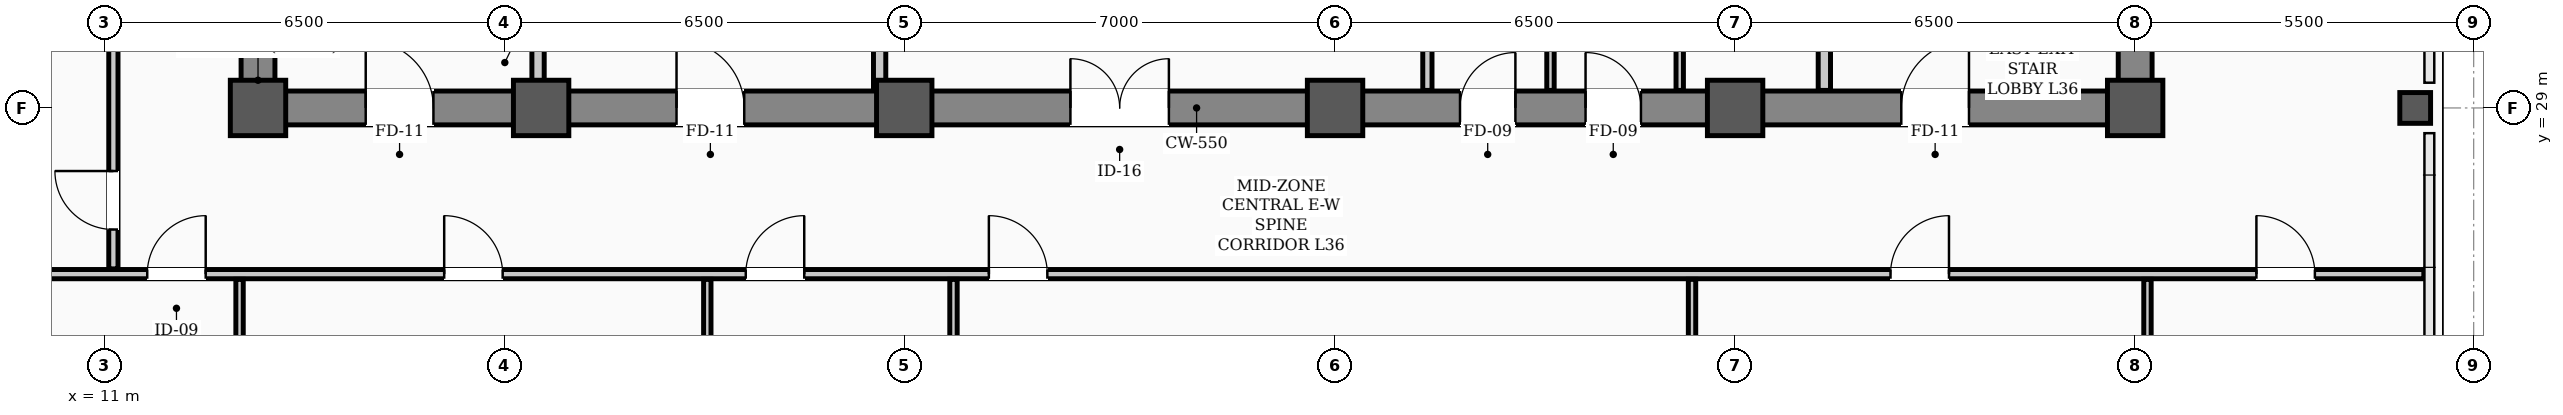
"""IFC4 building model, lengths in metres.
Left out: names, types, materials, properties, quantities, classifications, styles, units other than length and angle.
Written with IfcOpenShell. Run it as: python <this file> out.ifc"""

import sys

from ifc_helpers import new_model, si_unit, direction, frame, frame_2d, origin, origin_2d, place, context, subcontext, project, spatial, rectangle, hollow_rectangle, extrude, element, fill, save


model = new_model("IFC4")
c1 = context("Model", 3, precision=1e-05, world=origin(), true_north=direction((0.0, 1.0)))
c2 = subcontext(c1, "Body", "Model", "MODEL_VIEW")
j1 = project(units=[si_unit("LENGTHUNIT", "METRE"), si_unit("PLANEANGLEUNIT", "RADIAN")], contexts=[c1])
p1 = place(None, origin())
s1 = spatial("IfcSite", under=j1, at=p1, CompositionType="ELEMENT")
p2 = place(p1, origin())
s2 = spatial("IfcBuilding", under=s1, at=p2, CompositionType="ELEMENT")
p3 = place(p2, frame((0.0, 0.0, 146.1)))
s3 = spatial("IfcBuildingStorey", under=s2, at=p3, CompositionType="ELEMENT", Elevation=146.1)
for number, where, z_axis, x_axis in (
    (1, (13.5, 29.0, 0.0), (0.0, 0.0, 1.0), (1.0, 0.0, 0.0)),
    (2, (18.1, 29.0, 0.0), (0.0, 0.0, 1.0), (1.0, 0.0, 0.0)),
    (3, (24.0, 29.0, 0.0), (0.0, 0.0, 1.0), (1.0, 0.0, 0.0)),
    (4, (31.0, 29.0, 0.0), (0.0, 0.0, 1.0), (1.0, 0.0, 0.0)),
    (5, (37.5, 29.0, 0.0), (0.0, 0.0, 1.0), (1.0, 0.0, 0.0)),
    (6, (44.0, 29.0, 0.0), (0.0, 0.0, 1.0), (1.0, 0.0, 0.0)),
):
    element("IfcColumn", number, at=place(p3, frame(where, z_axis=z_axis, x_axis=x_axis)), inside=s3, PredefinedType="COLUMN", context=c2, shape_type="SweptSolid", body=[
        extrude(hollow_rectangle(XDim=0.9, YDim=0.9, WallThickness=0.035, InnerFilletRadius=0.017, OuterFilletRadius=0.052, at=origin_2d()), origin(), (0.0, 0.0, 1.0), 3.9),
    ])
p4 = place(p3, frame((48.55, 29.0, 0.0), z_axis=(0.0, 0.0, 1.0), x_axis=(1.0, 0.0, 0.0)))
e7 = element("IfcColumn", 7, at=p4, inside=s3, PredefinedType="COLUMN", context=c2, shape_type="SweptSolid", body=[
    extrude(hollow_rectangle(XDim=0.5, YDim=0.5, WallThickness=0.024, InnerFilletRadius=0.012, OuterFilletRadius=0.036, at=origin_2d()), origin(), (0.0, 0.0, 1.0), 3.9),
])
p5 = place(p3, frame((13.5, 29.0, 0.0), z_axis=(0.0, 0.0, 1.0), x_axis=(1.0, 0.0, 0.0)))
e8 = element("IfcWall", 8, at=p5, inside=s3, PredefinedType="SHEAR", context=c2, shape_type="SweptSolid", body=[
    extrude(rectangle(XDim=30.5, YDim=0.55, at=frame_2d((15.25, 0.0))), origin(), (0.0, 0.0, 1.0), 3.72),
])
p6 = place(p5, frame((1.75, 0.0, 0.0)))
e9 = element("IfcOpeningElement", 9, at=p6, cuts=e8, PredefinedType="OPENING", context=c2, shape_type="SweptSolid", body=[
    extrude(rectangle(XDim=1.1, YDim=2.08, at=frame_2d((0.55, 1.04))), frame((0.0, 0.285, 0.0), z_axis=(0.0, -1.0, 0.0), x_axis=(1.0, 0.0, 0.0)), (0.0, 0.0, 1.0), 0.57),
])
p7 = place(p5, frame((26.7, 0.0, 0.0)))
e10 = element("IfcOpeningElement", 10, at=p7, cuts=e8, PredefinedType="OPENING", context=c2, shape_type="SweptSolid", body=[
    extrude(rectangle(XDim=1.1, YDim=2.08, at=frame_2d((0.55, 1.04))), frame((0.0, 0.285, 0.0), z_axis=(0.0, -1.0, 0.0), x_axis=(1.0, 0.0, 0.0)), (0.0, 0.0, 1.0), 0.57),
])
p8 = place(p5, frame((6.8, 0.0, 0.0)))
e11 = element("IfcOpeningElement", 11, at=p8, cuts=e8, PredefinedType="OPENING", context=c2, shape_type="SweptSolid", body=[
    extrude(rectangle(XDim=1.1, YDim=2.08, at=frame_2d((0.55, 1.04))), frame((0.0, 0.285, 0.0), z_axis=(0.0, -1.0, 0.0), x_axis=(1.0, 0.0, 0.0)), (0.0, 0.0, 1.0), 0.57),
])
p9 = place(p5, frame((13.2, 0.0, 0.0)))
e12 = element("IfcOpeningElement", 12, at=p9, cuts=e8, PredefinedType="OPENING", context=c2, shape_type="SweptSolid", body=[
    extrude(rectangle(XDim=1.6, YDim=2.08, at=frame_2d((0.8, 1.04))), frame((0.0, 0.285, 0.0), z_axis=(0.0, -1.0, 0.0), x_axis=(1.0, 0.0, 0.0)), (0.0, 0.0, 1.0), 0.57),
])
p10 = place(p5, frame((19.53, 0.0, 0.0)))
e13 = element("IfcOpeningElement", 13, at=p10, cuts=e8, PredefinedType="OPENING", context=c2, shape_type="SweptSolid", body=[
    extrude(rectangle(XDim=0.9, YDim=2.08, at=frame_2d((0.45, 1.04))), frame((0.0, 0.285, 0.0), z_axis=(0.0, -1.0, 0.0), x_axis=(1.0, 0.0, 0.0)), (0.0, 0.0, 1.0), 0.57),
])
p11 = place(p5, frame((21.57, 0.0, 0.0)))
e14 = element("IfcOpeningElement", 14, at=p11, cuts=e8, PredefinedType="OPENING", context=c2, shape_type="SweptSolid", body=[
    extrude(rectangle(XDim=0.9, YDim=2.08, at=frame_2d((0.45, 1.04))), frame((0.0, 0.285, 0.0), z_axis=(0.0, -1.0, 0.0), x_axis=(1.0, 0.0, 0.0)), (0.0, 0.0, 1.0), 0.57),
])
for number, where, z_axis, x_axis in (
    (15, (13.5, 29.35, 0.0), (0.0, 0.0, 1.0), (0.0, 1.0, 0.0)),
    (16, (44.0, 29.35, 0.0), (0.0, 0.0, 1.0), (0.0, 1.0, 0.0)),
):
    element("IfcWall", number, at=place(p3, frame(where, z_axis=z_axis, x_axis=x_axis)), inside=s3, PredefinedType="SHEAR", context=c2, shape_type="SweptSolid", body=[
        extrude(rectangle(XDim=8.6, YDim=0.55, at=frame_2d((4.3, 0.0))), origin(), (0.0, 0.0, 1.0), 3.72),
    ])
p12 = place(p3, frame((2.31, 26.3, 0.0), z_axis=(0.0, 0.0, 1.0), x_axis=(1.0, 0.0, 0.0)))
e17 = element("IfcWall", 17, at=p12, inside=s3, PredefinedType="PARTITIONING", context=c2, shape_type="SweptSolid", body=[
    extrude(rectangle(XDim=46.38, YDim=0.15, at=frame_2d((23.19, 0.0))), origin(), (0.0, 0.0, 1.0), 3.2),
])
p13 = place(p12, frame((9.39, 0.0, 0.0)))
e18 = element("IfcOpeningElement", 18, at=p13, cuts=e17, PredefinedType="OPENING", context=c2, shape_type="SweptSolid", body=[
    extrude(rectangle(XDim=0.95, YDim=2.08, at=frame_2d((0.475, 1.04))), frame((0.0, 0.085, 0.0), z_axis=(0.0, -1.0, 0.0), x_axis=(1.0, 0.0, 0.0)), (0.0, 0.0, 1.0), 0.17),
])
p14 = place(p12, frame((14.215, 0.0, 0.0)))
e19 = element("IfcOpeningElement", 19, at=p14, cuts=e17, PredefinedType="OPENING", context=c2, shape_type="SweptSolid", body=[
    extrude(rectangle(XDim=0.95, YDim=2.08, at=frame_2d((0.475, 1.04))), frame((0.0, 0.085, 0.0), z_axis=(0.0, -1.0, 0.0), x_axis=(1.0, 0.0, 0.0)), (0.0, 0.0, 1.0), 0.17),
])
p15 = place(p12, frame((19.115, 0.0, 0.0)))
e20 = element("IfcOpeningElement", 20, at=p15, cuts=e17, PredefinedType="OPENING", context=c2, shape_type="SweptSolid", body=[
    extrude(rectangle(XDim=0.95, YDim=2.08, at=frame_2d((0.475, 1.04))), frame((0.0, 0.085, 0.0), z_axis=(0.0, -1.0, 0.0), x_axis=(1.0, 0.0, 0.0)), (0.0, 0.0, 1.0), 0.17),
])
p16 = place(p12, frame((23.065, 0.0, 0.0)))
e21 = element("IfcOpeningElement", 21, at=p16, cuts=e17, PredefinedType="OPENING", context=c2, shape_type="SweptSolid", body=[
    extrude(rectangle(XDim=0.95, YDim=2.08, at=frame_2d((0.475, 1.04))), frame((0.0, 0.085, 0.0), z_axis=(0.0, -1.0, 0.0), x_axis=(1.0, 0.0, 0.0)), (0.0, 0.0, 1.0), 0.17),
])
p17 = place(p12, frame((37.715, 0.0, 0.0)))
e22 = element("IfcOpeningElement", 22, at=p17, cuts=e17, PredefinedType="OPENING", context=c2, shape_type="SweptSolid", body=[
    extrude(rectangle(XDim=0.95, YDim=2.08, at=frame_2d((0.475, 1.04))), frame((0.0, 0.085, 0.0), z_axis=(0.0, -1.0, 0.0), x_axis=(1.0, 0.0, 0.0)), (0.0, 0.0, 1.0), 0.17),
])
p18 = place(p12, frame((43.66, 0.0, 0.0)))
e23 = element("IfcOpeningElement", 23, at=p18, cuts=e17, PredefinedType="OPENING", context=c2, shape_type="SweptSolid", body=[
    extrude(rectangle(XDim=0.95, YDim=2.08, at=frame_2d((0.475, 1.04))), frame((0.0, 0.085, 0.0), z_axis=(0.0, -1.0, 0.0), x_axis=(1.0, 0.0, 0.0)), (0.0, 0.0, 1.0), 0.17),
])
for number, where, z_axis, x_axis in (
    (24, (18.05, 29.285, 0.0), (0.0, 0.0, 1.0), (0.0, 1.0, 0.0)),
    (25, (38.95, 29.285, 0.0), (0.0, 0.0, 1.0), (0.0, 1.0, 0.0)),
):
    element("IfcWall", number, at=place(p3, frame(where, z_axis=z_axis, x_axis=x_axis)), inside=s3, PredefinedType="STANDARD", context=c2, shape_type="SweptSolid", body=[
        extrude(rectangle(XDim=1.015, YDim=0.2, at=frame_2d((0.508, 0.0))), origin(), (0.0, 0.0, 1.0), 3.35),
    ])
p19 = place(p3, frame((23.6, 29.285, 0.0), z_axis=(0.0, 0.0, 1.0), x_axis=(0.0, 1.0, 0.0)))
e26 = element("IfcWall", 26, at=p19, inside=s3, PredefinedType="STANDARD", context=c2, shape_type="SweptSolid", body=[
    extrude(rectangle(XDim=5.415, YDim=0.2, at=frame_2d((2.708, 0.0))), origin(), (0.0, 0.0, 1.0), 3.2),
])
p20 = place(p3, frame((32.5, 29.285, 0.0), z_axis=(0.0, 0.0, 1.0), x_axis=(0.0, 1.0, 0.0)))
e27 = element("IfcWall", 27, at=p20, inside=s3, PredefinedType="PARTITIONING", context=c2, shape_type="SweptSolid", body=[
    extrude(rectangle(XDim=2.48, YDim=0.15, at=frame_2d((1.24, 0.0))), origin(), (0.0, 0.0, 1.0), 3.35),
])
for number, where, z_axis, x_axis in (
    (28, (36.6, 29.285, 0.0), (0.0, 0.0, 1.0), (0.0, 1.0, 0.0)),
    (29, (34.5, 29.285, 0.0), (0.0, 0.0, 1.0), (0.0, 1.0, 0.0)),
):
    element("IfcWall", number, at=place(p3, frame(where, z_axis=z_axis, x_axis=x_axis)), inside=s3, PredefinedType="PARTITIONING", context=c2, shape_type="SweptSolid", body=[
        extrude(rectangle(XDim=2.48, YDim=0.12, at=frame_2d((1.24, 0.0))), origin(), (0.0, 0.0, 1.0), 3.35),
    ])
p21 = place(p3, frame((11.15, 26.385, 0.0), z_axis=(0.0, 0.0, 1.0), x_axis=(0.0, 1.0, 0.0)))
e30 = element("IfcWall", 30, at=p21, inside=s3, PredefinedType="PARTITIONING", context=c2, shape_type="SweptSolid", body=[
    extrude(rectangle(XDim=13.58, YDim=0.15, at=frame_2d((6.79, 0.0))), origin(), (0.0, 0.0, 1.0), 3.1),
])
p22 = place(p21, frame((0.64, 0.0, 0.0)))
e31 = element("IfcOpeningElement", 31, at=p22, cuts=e30, PredefinedType="OPENING", context=c2, shape_type="SweptSolid", body=[
    extrude(rectangle(XDim=0.95, YDim=2.08, at=frame_2d((0.475, 1.04))), frame((0.0, 0.085, 0.0), z_axis=(0.0, -1.0, 0.0), x_axis=(1.0, 0.0, 0.0)), (0.0, 0.0, 1.0), 0.17),
])
p23 = place(p21, frame((6.94, 0.0, 0.0)))
e32 = element("IfcOpeningElement", 32, at=p23, cuts=e30, PredefinedType="OPENING", context=c2, shape_type="SweptSolid", body=[
    extrude(rectangle(XDim=0.95, YDim=2.08, at=frame_2d((0.475, 1.04))), frame((0.0, 0.085, 0.0), z_axis=(0.0, -1.0, 0.0), x_axis=(1.0, 0.0, 0.0)), (0.0, 0.0, 1.0), 0.17),
])
p24 = place(p21, frame((11.065, 0.0, 0.0)))
e33 = element("IfcOpeningElement", 33, at=p24, cuts=e30, PredefinedType="OPENING", context=c2, shape_type="SweptSolid", body=[
    extrude(rectangle(XDim=0.95, YDim=2.08, at=frame_2d((0.475, 1.04))), frame((0.0, 0.085, 0.0), z_axis=(0.0, -1.0, 0.0), x_axis=(1.0, 0.0, 0.0)), (0.0, 0.0, 1.0), 0.17),
])
for number, where, z_axis, x_axis in (
    (34, (13.2, 16.31, 0.0), (0.0, 0.0, 1.0), (0.0, 1.0, 0.0)),
    (35, (20.8, 16.31, 0.0), (0.0, 0.0, 1.0), (0.0, 1.0, 0.0)),
):
    element("IfcWall", number, at=place(p3, frame(where, z_axis=z_axis, x_axis=x_axis)), inside=s3, PredefinedType="PARTITIONING", context=c2, shape_type="SweptSolid", body=[
        extrude(rectangle(XDim=9.905, YDim=0.12, at=frame_2d((4.953, 0.0))), origin(), (0.0, 0.0, 1.0), 3.1),
    ])
p25 = place(p3, frame((24.8, 18.07, 0.0), z_axis=(0.0, 0.0, 1.0), x_axis=(0.0, 1.0, 0.0)))
e36 = element("IfcWall", 36, at=p25, inside=s3, PredefinedType="PARTITIONING", context=c2, shape_type="SweptSolid", body=[
    extrude(rectangle(XDim=8.145, YDim=0.12, at=frame_2d((4.073, 0.0))), origin(), (0.0, 0.0, 1.0), 3.1),
])
for number, where, z_axis, x_axis in (
    (37, (36.8, 16.31, 0.0), (0.0, 0.0, 1.0), (0.0, 1.0, 0.0)),
    (38, (44.2, 16.31, 0.0), (0.0, 0.0, 1.0), (0.0, 1.0, 0.0)),
):
    element("IfcWall", number, at=place(p3, frame(where, z_axis=z_axis, x_axis=x_axis)), inside=s3, PredefinedType="PARTITIONING", context=c2, shape_type="SweptSolid", body=[
        extrude(rectangle(XDim=9.905, YDim=0.12, at=frame_2d((4.953, 0.0))), origin(), (0.0, 0.0, 1.0), 3.1),
    ])
p26 = place(p6, origin())
e39 = element("IfcDoor", 39, at=p26, inside=s3, OperationType="SINGLE_SWING_LEFT", PredefinedType="DOOR", context=c2, shape_type="SweptSolid", body=[
    extrude(rectangle(XDim=1.1, YDim=2.08, at=frame_2d((0.55, 1.04))), frame((0.0, 0.025, 0.0), z_axis=(0.0, -1.0, 0.0), x_axis=(1.0, 0.0, 0.0)), (0.0, 0.0, 1.0), 0.05),
])
fill(e9, e39)
p27 = place(p7, origin())
e40 = element("IfcDoor", 40, at=p27, inside=s3, OperationType="SINGLE_SWING_RIGHT", PredefinedType="DOOR", context=c2, shape_type="SweptSolid", body=[
    extrude(rectangle(XDim=1.1, YDim=2.08, at=frame_2d((0.55, 1.04))), frame((0.0, 0.025, 0.0), z_axis=(0.0, -1.0, 0.0), x_axis=(1.0, 0.0, 0.0)), (0.0, 0.0, 1.0), 0.05),
])
fill(e10, e40)
p28 = place(p8, origin())
e41 = element("IfcDoor", 41, at=p28, inside=s3, OperationType="SINGLE_SWING_LEFT", PredefinedType="DOOR", context=c2, shape_type="SweptSolid", body=[
    extrude(rectangle(XDim=1.1, YDim=2.08, at=frame_2d((0.55, 1.04))), frame((0.0, 0.025, 0.0), z_axis=(0.0, -1.0, 0.0), x_axis=(1.0, 0.0, 0.0)), (0.0, 0.0, 1.0), 0.05),
])
fill(e11, e41)
p29 = place(p9, origin())
e42 = element("IfcDoor", 42, at=p29, inside=s3, OperationType="DOUBLE_DOOR_SINGLE_SWING", PredefinedType="DOOR", context=c2, shape_type="SweptSolid", body=[
    extrude(rectangle(XDim=1.6, YDim=2.08, at=frame_2d((0.8, 1.04))), frame((0.0, 0.025, 0.0), z_axis=(0.0, -1.0, 0.0), x_axis=(1.0, 0.0, 0.0)), (0.0, 0.0, 1.0), 0.05),
])
fill(e12, e42)
p30 = place(p10, origin())
e43 = element("IfcDoor", 43, at=p30, inside=s3, OperationType="SINGLE_SWING_RIGHT", PredefinedType="DOOR", context=c2, shape_type="SweptSolid", body=[
    extrude(rectangle(XDim=0.9, YDim=2.08, at=frame_2d((0.45, 1.04))), frame((0.0, 0.025, 0.0), z_axis=(0.0, -1.0, 0.0), x_axis=(1.0, 0.0, 0.0)), (0.0, 0.0, 1.0), 0.05),
])
fill(e13, e43)
p31 = place(p11, origin())
e44 = element("IfcDoor", 44, at=p31, inside=s3, OperationType="SINGLE_SWING_LEFT", PredefinedType="DOOR", context=c2, shape_type="SweptSolid", body=[
    extrude(rectangle(XDim=0.9, YDim=2.08, at=frame_2d((0.45, 1.04))), frame((0.0, 0.025, 0.0), z_axis=(0.0, -1.0, 0.0), x_axis=(1.0, 0.0, 0.0)), (0.0, 0.0, 1.0), 0.05),
])
fill(e14, e44)
p32 = place(p13, origin())
e45 = element("IfcDoor", 45, at=p32, inside=s3, OperationType="SINGLE_SWING_RIGHT", PredefinedType="DOOR", context=c2, shape_type="SweptSolid", body=[
    extrude(rectangle(XDim=0.95, YDim=2.08, at=frame_2d((0.475, 1.04))), frame((0.0, 0.025, 0.0), z_axis=(0.0, -1.0, 0.0), x_axis=(1.0, 0.0, 0.0)), (0.0, 0.0, 1.0), 0.05),
])
fill(e18, e45)
p33 = place(p14, origin())
e46 = element("IfcDoor", 46, at=p33, inside=s3, OperationType="SINGLE_SWING_LEFT", PredefinedType="DOOR", context=c2, shape_type="SweptSolid", body=[
    extrude(rectangle(XDim=0.95, YDim=2.08, at=frame_2d((0.475, 1.04))), frame((0.0, 0.025, 0.0), z_axis=(0.0, -1.0, 0.0), x_axis=(1.0, 0.0, 0.0)), (0.0, 0.0, 1.0), 0.05),
])
fill(e19, e46)
p34 = place(p15, origin())
e47 = element("IfcDoor", 47, at=p34, inside=s3, OperationType="SINGLE_SWING_RIGHT", PredefinedType="DOOR", context=c2, shape_type="SweptSolid", body=[
    extrude(rectangle(XDim=0.95, YDim=2.08, at=frame_2d((0.475, 1.04))), frame((0.0, 0.025, 0.0), z_axis=(0.0, -1.0, 0.0), x_axis=(1.0, 0.0, 0.0)), (0.0, 0.0, 1.0), 0.05),
])
fill(e20, e47)
p35 = place(p16, origin())
e48 = element("IfcDoor", 48, at=p35, inside=s3, OperationType="SINGLE_SWING_LEFT", PredefinedType="DOOR", context=c2, shape_type="SweptSolid", body=[
    extrude(rectangle(XDim=0.95, YDim=2.08, at=frame_2d((0.475, 1.04))), frame((0.0, 0.025, 0.0), z_axis=(0.0, -1.0, 0.0), x_axis=(1.0, 0.0, 0.0)), (0.0, 0.0, 1.0), 0.05),
])
fill(e21, e48)
p36 = place(p17, origin())
e49 = element("IfcDoor", 49, at=p36, inside=s3, OperationType="SINGLE_SWING_RIGHT", PredefinedType="DOOR", context=c2, shape_type="SweptSolid", body=[
    extrude(rectangle(XDim=0.95, YDim=2.08, at=frame_2d((0.475, 1.04))), frame((0.0, 0.025, 0.0), z_axis=(0.0, -1.0, 0.0), x_axis=(1.0, 0.0, 0.0)), (0.0, 0.0, 1.0), 0.05),
])
fill(e22, e49)
p37 = place(p18, origin())
e50 = element("IfcDoor", 50, at=p37, inside=s3, OperationType="SINGLE_SWING_LEFT", PredefinedType="DOOR", context=c2, shape_type="SweptSolid", body=[
    extrude(rectangle(XDim=0.95, YDim=2.08, at=frame_2d((0.475, 1.04))), frame((0.0, 0.025, 0.0), z_axis=(0.0, -1.0, 0.0), x_axis=(1.0, 0.0, 0.0)), (0.0, 0.0, 1.0), 0.05),
])
fill(e23, e50)
p38 = place(p22, origin())
e51 = element("IfcDoor", 51, at=p38, inside=s3, OperationType="SINGLE_SWING_RIGHT", PredefinedType="DOOR", context=c2, shape_type="SweptSolid", body=[
    extrude(rectangle(XDim=0.95, YDim=2.08, at=frame_2d((0.475, 1.04))), frame((0.0, 0.025, 0.0), z_axis=(0.0, -1.0, 0.0), x_axis=(1.0, 0.0, 0.0)), (0.0, 0.0, 1.0), 0.05),
])
fill(e31, e51)
save(model, sys.argv[1])
